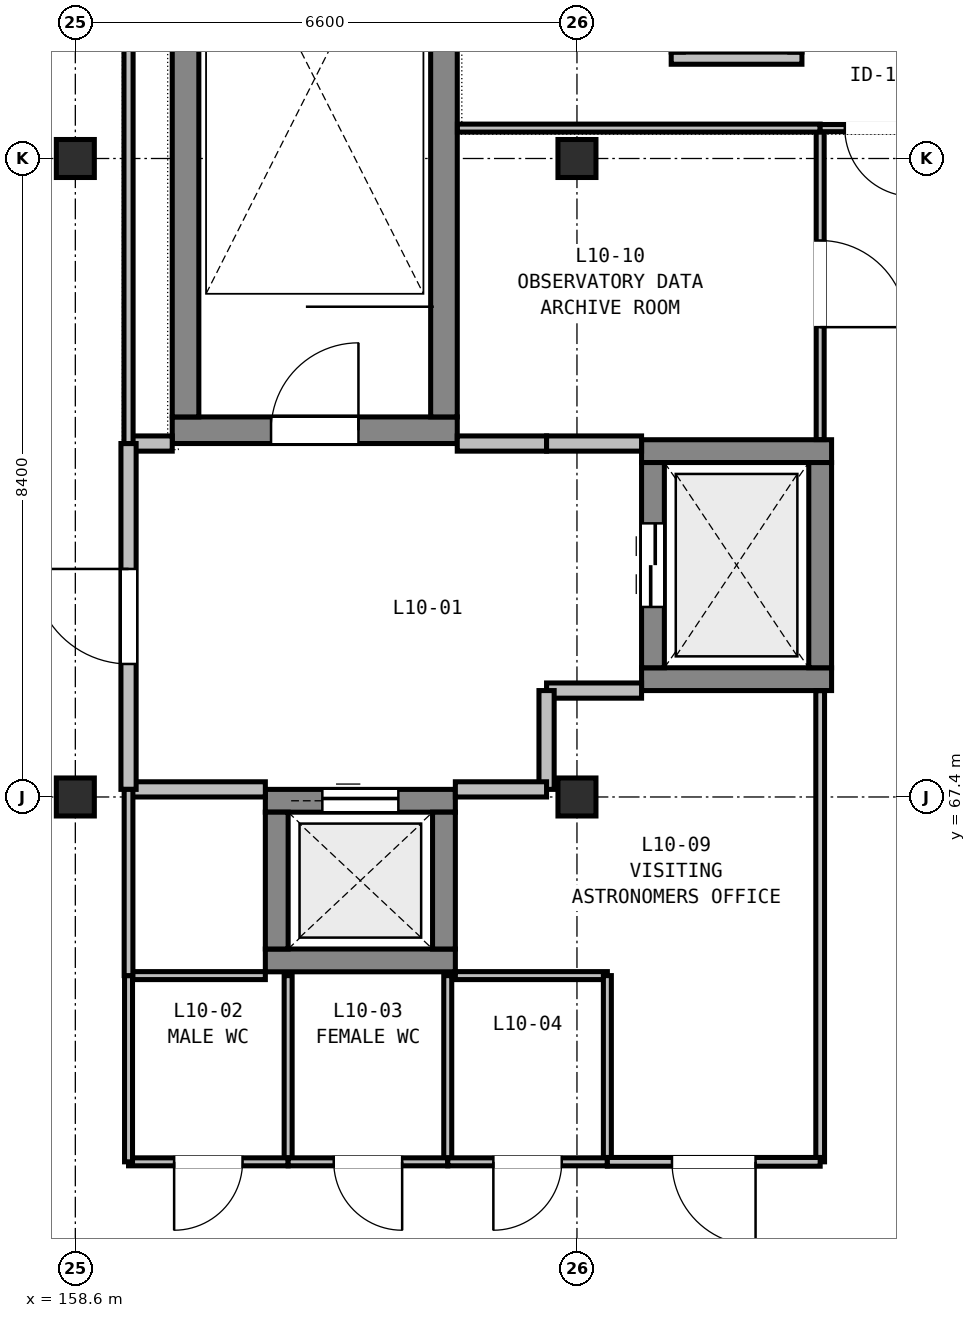
"""IFC4 building model, lengths in metres.
Left out: names, types, materials, properties, quantities, classifications, styles, units other than length and angle.
Written with IfcOpenShell. Run it as: python <this file> out.ifc"""

import sys

from ifc_helpers import new_model, si_unit, direction, frame, frame_2d, origin, origin_2d, place, context, subcontext, project, spatial, rectangle, extrude, element, fill, save


model = new_model("IFC4")
c1 = context("Model", 3, precision=1e-05, world=origin(), true_north=direction((0.0, 1.0)))
c2 = subcontext(c1, "Body", "Model", "MODEL_VIEW")
j1 = project(units=[si_unit("LENGTHUNIT", "METRE"), si_unit("PLANEANGLEUNIT", "RADIAN")], contexts=[c1])
p1 = place(None, origin())
s1 = spatial("IfcSite", under=j1, at=p1, CompositionType="ELEMENT")
p2 = place(p1, origin())
s2 = spatial("IfcBuilding", under=s1, at=p2, CompositionType="ELEMENT")
p3 = place(p2, frame((0.0, 0.0, 44.4)))
s3 = spatial("IfcBuildingStorey", under=s2, at=p3, CompositionType="ELEMENT", Elevation=44.4)
for number, where, z_axis, x_axis in (
    (1, (158.6, 67.4, 0.0), (0.0, 0.0, 1.0), (1.0, 0.0, 0.0)),
    (2, (158.6, 75.8, 0.0), (0.0, 0.0, 1.0), (1.0, 0.0, 0.0)),
    (3, (165.2, 67.4, 0.0), (0.0, 0.0, 1.0), (1.0, 0.0, 0.0)),
    (4, (165.2, 75.8, 0.0), (0.0, 0.0, 1.0), (1.0, 0.0, 0.0)),
):
    element("IfcColumn", number, at=place(p3, frame(where, z_axis=z_axis, x_axis=x_axis)), inside=s3, PredefinedType="COLUMN", context=c2, shape_type="SweptSolid", body=[
        extrude(rectangle(XDim=0.5, YDim=0.5, at=origin_2d()), origin(), (0.0, 0.0, 1.0), 3.72),
    ])
p4 = place(p3, frame((159.875, 72.225, 0.0), z_axis=(0.0, 0.0, 1.0), x_axis=(1.0, 0.0, 0.0)))
e5 = element("IfcWall", 5, at=p4, inside=s3, PredefinedType="SHEAR", context=c2, shape_type="SweptSolid", body=[
    extrude(rectangle(XDim=3.75, YDim=0.35, at=frame_2d((1.875, 0.0))), origin(), (0.0, 0.0, 1.0), 3.55),
])
p5 = place(p4, frame((1.3, 0.0, 0.0)))
e6 = element("IfcOpeningElement", 6, at=p5, cuts=e5, PredefinedType="OPENING", context=c2, shape_type="SweptSolid", body=[
    extrude(rectangle(XDim=1.15, YDim=2.15, at=frame_2d((0.575, 1.075))), frame((0.0, 0.185, 0.0), z_axis=(0.0, -1.0, 0.0), x_axis=(1.0, 0.0, 0.0)), (0.0, 0.0, 1.0), 0.37),
])
for number, where, z_axis, x_axis in (
    (7, (160.05, 72.4, 0.0), (0.0, 0.0, 1.0), (0.0, 1.0, 0.0)),
    (8, (163.45, 72.4, 0.0), (0.0, 0.0, 1.0), (0.0, 1.0, 0.0)),
):
    element("IfcWall", number, at=place(p3, frame(where, z_axis=z_axis, x_axis=x_axis)), inside=s3, PredefinedType="SHEAR", context=c2, shape_type="SweptSolid", body=[
        extrude(rectangle(XDim=7.375, YDim=0.35, at=frame_2d((3.688, 0.0))), origin(), (0.0, 0.0, 1.0), 3.55),
    ])
for number, where, z_axis, x_axis in (
    (9, (166.05, 68.95, 0.0), (0.0, 0.0, 1.0), (1.0, 0.0, 0.0)),
    (10, (166.05, 71.95, 0.0), (0.0, 0.0, 1.0), (1.0, 0.0, 0.0)),
):
    element("IfcWall", number, at=place(p3, frame(where, z_axis=z_axis, x_axis=x_axis)), inside=s3, PredefinedType="SHEAR", context=c2, shape_type="SweptSolid", body=[
        extrude(rectangle(XDim=2.5, YDim=0.3, at=frame_2d((1.25, 0.0))), origin(), (0.0, 0.0, 1.0), 3.55),
    ])
p6 = place(p3, frame((166.2, 69.1, 0.0), z_axis=(0.0, 0.0, 1.0), x_axis=(0.0, 1.0, 0.0)))
e11 = element("IfcWall", 11, at=p6, inside=s3, PredefinedType="SHEAR", context=c2, shape_type="SweptSolid", body=[
    extrude(rectangle(XDim=2.7, YDim=0.3, at=frame_2d((1.35, 0.0))), origin(), (0.0, 0.0, 1.0), 3.55),
])
p7 = place(p6, frame((0.8, 0.0, 0.0)))
e12 = element("IfcOpeningElement", 12, at=p7, cuts=e11, PredefinedType="OPENING", context=c2, shape_type="SweptSolid", body=[
    extrude(rectangle(XDim=1.1, YDim=2.1, at=frame_2d((0.55, 1.05))), frame((0.0, 0.16, 0.0), z_axis=(0.0, -1.0, 0.0), x_axis=(1.0, 0.0, 0.0)), (0.0, 0.0, 1.0), 0.32),
])
p8 = place(p3, frame((168.4, 69.1, 0.0), z_axis=(0.0, 0.0, 1.0), x_axis=(0.0, 1.0, 0.0)))
e13 = element("IfcWall", 13, at=p8, inside=s3, PredefinedType="SHEAR", context=c2, shape_type="SweptSolid", body=[
    extrude(rectangle(XDim=2.7, YDim=0.3, at=frame_2d((1.35, 0.0))), origin(), (0.0, 0.0, 1.0), 3.55),
])
p9 = place(p3, frame((161.1, 65.25, 0.0), z_axis=(0.0, 0.0, 1.0), x_axis=(1.0, 0.0, 0.0)))
e14 = element("IfcWall", 14, at=p9, inside=s3, PredefinedType="SHEAR", context=c2, shape_type="SweptSolid", body=[
    extrude(rectangle(XDim=2.5, YDim=0.3, at=frame_2d((1.25, 0.0))), origin(), (0.0, 0.0, 1.0), 3.55),
])
p10 = place(p3, frame((161.1, 67.35, 0.0), z_axis=(0.0, 0.0, 1.0), x_axis=(1.0, 0.0, 0.0)))
e15 = element("IfcWall", 15, at=p10, inside=s3, PredefinedType="SHEAR", context=c2, shape_type="SweptSolid", body=[
    extrude(rectangle(XDim=2.5, YDim=0.3, at=frame_2d((1.25, 0.0))), origin(), (0.0, 0.0, 1.0), 3.55),
])
p11 = place(p10, frame((0.75, 0.0, 0.0)))
e16 = element("IfcOpeningElement", 16, at=p11, cuts=e15, PredefinedType="OPENING", context=c2, shape_type="SweptSolid", body=[
    extrude(rectangle(XDim=1.0, YDim=2.1, at=frame_2d((0.5, 1.05))), frame((0.0, 0.16, 0.0), z_axis=(0.0, -1.0, 0.0), x_axis=(1.0, 0.0, 0.0)), (0.0, 0.0, 1.0), 0.32),
])
for number, where, z_axis, x_axis in (
    (17, (161.25, 65.4, 0.0), (0.0, 0.0, 1.0), (0.0, 1.0, 0.0)),
    (18, (163.45, 65.4, 0.0), (0.0, 0.0, 1.0), (0.0, 1.0, 0.0)),
):
    element("IfcWall", number, at=place(p3, frame(where, z_axis=z_axis, x_axis=x_axis)), inside=s3, PredefinedType="SHEAR", context=c2, shape_type="SweptSolid", body=[
        extrude(rectangle(XDim=1.8, YDim=0.3, at=frame_2d((0.9, 0.0))), origin(), (0.0, 0.0, 1.0), 3.55),
    ])
p12 = place(p3, frame((166.44, 77.12, 0.0), z_axis=(0.0, 0.0, 1.0), x_axis=(1.0, 0.0, 0.0)))
e19 = element("IfcWall", 19, at=p12, inside=s3, PredefinedType="PARTITIONING", context=c2, shape_type="SweptSolid", body=[
    extrude(rectangle(XDim=1.72, YDim=0.16, at=frame_2d((0.86, 0.0))), origin(), (0.0, 0.0, 1.0), 3.36),
])
p13 = place(p3, frame((159.3, 72.05, 0.0), z_axis=(0.0, 0.0, 1.0), x_axis=(1.0, 0.0, 0.0)))
e20 = element("IfcWall", 20, at=p13, inside=s3, PredefinedType="PARTITIONING", context=c2, shape_type="SweptSolid", body=[
    extrude(rectangle(XDim=0.575, YDim=0.2, at=frame_2d((0.288, 0.0))), origin(), (0.0, 0.0, 1.0), 3.36),
])
p14 = place(p3, frame((163.625, 72.05, 0.0), z_axis=(0.0, 0.0, 1.0), x_axis=(1.0, 0.0, 0.0)))
e21 = element("IfcWall", 21, at=p14, inside=s3, PredefinedType="PARTITIONING", context=c2, shape_type="SweptSolid", body=[
    extrude(rectangle(XDim=1.175, YDim=0.2, at=frame_2d((0.587, 0.0))), origin(), (0.0, 0.0, 1.0), 2.635),
])
for number, where, z_axis, x_axis in (
    (22, (164.8, 72.05, 0.0), (0.0, 0.0, 1.0), (1.0, 0.0, 0.0)),
    (23, (166.05, 68.8, 0.0), (0.0, 0.0, 1.0), (-1.0, 0.0, 0.0)),
):
    element("IfcWall", number, at=place(p3, frame(where, z_axis=z_axis, x_axis=x_axis)), inside=s3, PredefinedType="PARTITIONING", context=c2, shape_type="SweptSolid", body=[
        extrude(rectangle(XDim=1.25, YDim=0.2, at=frame_2d((0.625, 0.0))), origin(), (0.0, 0.0, 1.0), 2.635),
    ])
p15 = place(p3, frame((164.8, 68.8, 0.0), z_axis=(0.0, 0.0, 1.0), x_axis=(0.0, -1.0, 0.0)))
e24 = element("IfcWall", 24, at=p15, inside=s3, PredefinedType="PARTITIONING", context=c2, shape_type="SweptSolid", body=[
    extrude(rectangle(XDim=1.3, YDim=0.2, at=frame_2d((0.65, 0.0))), origin(), (0.0, 0.0, 1.0), 2.635),
])
p16 = place(p3, frame((164.8, 67.5, 0.0), z_axis=(0.0, 0.0, 1.0), x_axis=(-1.0, 0.0, 0.0)))
e25 = element("IfcWall", 25, at=p16, inside=s3, PredefinedType="PARTITIONING", context=c2, shape_type="SweptSolid", body=[
    extrude(rectangle(XDim=1.2, YDim=0.2, at=frame_2d((0.6, 0.0))), origin(), (0.0, 0.0, 1.0), 2.885),
])
p17 = place(p3, frame((161.1, 67.5, 0.0), z_axis=(0.0, 0.0, 1.0), x_axis=(-1.0, 0.0, 0.0)))
e26 = element("IfcWall", 26, at=p17, inside=s3, PredefinedType="PARTITIONING", context=c2, shape_type="SweptSolid", body=[
    extrude(rectangle(XDim=1.8, YDim=0.2, at=frame_2d((0.9, 0.0))), origin(), (0.0, 0.0, 1.0), 2.885),
])
p18 = place(p3, frame((159.3, 67.5, 0.0), z_axis=(0.0, 0.0, 1.0), x_axis=(0.0, 1.0, 0.0)))
e27 = element("IfcWall", 27, at=p18, inside=s3, PredefinedType="PARTITIONING", context=c2, shape_type="SweptSolid", body=[
    extrude(rectangle(XDim=4.55, YDim=0.2, at=frame_2d((2.275, 0.0))), origin(), (0.0, 0.0, 1.0), 2.885),
])
p19 = place(p18, frame((1.65, 0.0, 0.0)))
e28 = element("IfcOpeningElement", 28, at=p19, cuts=e27, PredefinedType="OPENING", context=c2, shape_type="SweptSolid", body=[
    extrude(rectangle(XDim=1.25, YDim=2.15, at=frame_2d((0.625, 1.075))), frame((0.0, 0.11, 0.0), z_axis=(0.0, -1.0, 0.0), x_axis=(1.0, 0.0, 0.0)), (0.0, 0.0, 1.0), 0.22),
])
p20 = place(p3, frame((159.3, 65.05, 0.0), z_axis=(0.0, 0.0, 1.0), x_axis=(1.0, 0.0, 0.0)))
e29 = element("IfcWall", 29, at=p20, inside=s3, PredefinedType="PARTITIONING", context=c2, shape_type="SweptSolid", body=[
    extrude(rectangle(XDim=1.8, YDim=0.105, at=frame_2d((0.9, 0.0))), origin(), (0.0, 0.0, 1.0), 3.36),
])
p21 = place(p3, frame((161.4, 65.05, 0.0), z_axis=(0.0, 0.0, 1.0), x_axis=(0.0, -1.0, 0.0)))
e30 = element("IfcWall", 30, at=p21, inside=s3, PredefinedType="PARTITIONING", context=c2, shape_type="SweptSolid", body=[
    extrude(rectangle(XDim=2.45, YDim=0.105, at=frame_2d((1.225, 0.0))), origin(), (0.0, 0.0, 1.0), 3.36),
])
p22 = place(p3, frame((161.4, 62.6, 0.0), z_axis=(0.0, 0.0, 1.0), x_axis=(-1.0, 0.0, 0.0)))
e31 = element("IfcWall", 31, at=p22, inside=s3, PredefinedType="PARTITIONING", context=c2, shape_type="SweptSolid", body=[
    extrude(rectangle(XDim=2.1, YDim=0.105, at=frame_2d((1.05, 0.0))), origin(), (0.0, 0.0, 1.0), 3.36),
])
p23 = place(p22, frame((0.6, 0.0, 0.0)))
e32 = element("IfcOpeningElement", 32, at=p23, cuts=e31, PredefinedType="OPENING", context=c2, shape_type="SweptSolid", body=[
    extrude(rectangle(XDim=0.9, YDim=2.02, at=frame_2d((0.45, 1.01))), frame((0.0, 0.062, 0.0), z_axis=(0.0, -1.0, 0.0), x_axis=(1.0, 0.0, 0.0)), (0.0, 0.0, 1.0), 0.125),
])
for number, where, z_axis, x_axis in (
    (33, (159.3, 62.6, 0.0), (0.0, 0.0, 1.0), (0.0, 1.0, 0.0)),
    (34, (163.5, 65.05, 0.0), (0.0, 0.0, 1.0), (0.0, -1.0, 0.0)),
):
    element("IfcWall", number, at=place(p3, frame(where, z_axis=z_axis, x_axis=x_axis)), inside=s3, PredefinedType="PARTITIONING", context=c2, shape_type="SweptSolid", body=[
        extrude(rectangle(XDim=2.45, YDim=0.105, at=frame_2d((1.225, 0.0))), origin(), (0.0, 0.0, 1.0), 3.36),
    ])
p24 = place(p3, frame((163.5, 62.6, 0.0), z_axis=(0.0, 0.0, 1.0), x_axis=(-1.0, 0.0, 0.0)))
e35 = element("IfcWall", 35, at=p24, inside=s3, PredefinedType="PARTITIONING", context=c2, shape_type="SweptSolid", body=[
    extrude(rectangle(XDim=2.1, YDim=0.105, at=frame_2d((1.05, 0.0))), origin(), (0.0, 0.0, 1.0), 3.36),
])
p25 = place(p24, frame((0.6, 0.0, 0.0)))
e36 = element("IfcOpeningElement", 36, at=p25, cuts=e35, PredefinedType="OPENING", context=c2, shape_type="SweptSolid", body=[
    extrude(rectangle(XDim=0.9, YDim=2.02, at=frame_2d((0.45, 1.01))), frame((0.0, 0.062, 0.0), z_axis=(0.0, -1.0, 0.0), x_axis=(1.0, 0.0, 0.0)), (0.0, 0.0, 1.0), 0.125),
])
p26 = place(p3, frame((163.6, 65.05, 0.0), z_axis=(0.0, 0.0, 1.0), x_axis=(1.0, 0.0, 0.0)))
e37 = element("IfcWall", 37, at=p26, inside=s3, PredefinedType="PARTITIONING", context=c2, shape_type="SweptSolid", body=[
    extrude(rectangle(XDim=2.0, YDim=0.105, at=frame_2d((1.0, 0.0))), origin(), (0.0, 0.0, 1.0), 3.36),
])
p27 = place(p3, frame((165.6, 65.05, 0.0), z_axis=(0.0, 0.0, 1.0), x_axis=(0.0, -1.0, 0.0)))
e38 = element("IfcWall", 38, at=p27, inside=s3, PredefinedType="PARTITIONING", context=c2, shape_type="SweptSolid", body=[
    extrude(rectangle(XDim=2.45, YDim=0.105, at=frame_2d((1.225, 0.0))), origin(), (0.0, 0.0, 1.0), 3.36),
])
p28 = place(p3, frame((165.6, 62.6, 0.0), z_axis=(0.0, 0.0, 1.0), x_axis=(-1.0, 0.0, 0.0)))
e39 = element("IfcWall", 39, at=p28, inside=s3, PredefinedType="PARTITIONING", context=c2, shape_type="SweptSolid", body=[
    extrude(rectangle(XDim=2.1, YDim=0.105, at=frame_2d((1.05, 0.0))), origin(), (0.0, 0.0, 1.0), 3.36),
])
p29 = place(p28, frame((0.6, 0.0, 0.0)))
e40 = element("IfcOpeningElement", 40, at=p29, cuts=e39, PredefinedType="OPENING", context=c2, shape_type="SweptSolid", body=[
    extrude(rectangle(XDim=0.9, YDim=2.02, at=frame_2d((0.45, 1.01))), frame((0.0, 0.062, 0.0), z_axis=(0.0, -1.0, 0.0), x_axis=(1.0, 0.0, 0.0)), (0.0, 0.0, 1.0), 0.125),
])
p30 = place(p3, frame((159.3, 72.05, 0.0), z_axis=(0.0, 0.0, 1.0), x_axis=(0.0, 1.0, 0.0)))
e41 = element("IfcWall", 41, at=p30, inside=s3, PredefinedType="PARTITIONING", context=c2, shape_type="SweptSolid", body=[
    extrude(rectangle(XDim=6.15, YDim=0.12, at=frame_2d((3.075, 0.0))), origin(), (0.0, 0.0, 1.0), 2.885),
])
p31 = place(p3, frame((168.4, 68.798, 0.0), z_axis=(0.0, 0.0, 1.0), x_axis=(0.0, -1.0, 0.0)))
e42 = element("IfcWall", 42, at=p31, inside=s3, PredefinedType="PARTITIONING", context=c2, shape_type="SweptSolid", body=[
    extrude(rectangle(XDim=6.198, YDim=0.115, at=frame_2d((3.099, 0.0))), origin(), (0.0, 0.0, 1.0), 3.36),
])
p32 = place(p3, frame((168.4, 62.6, 0.0), z_axis=(0.0, 0.0, 1.0), x_axis=(-1.0, 0.0, 0.0)))
e43 = element("IfcWall", 43, at=p32, inside=s3, PredefinedType="PARTITIONING", context=c2, shape_type="SweptSolid", body=[
    extrude(rectangle(XDim=2.8, YDim=0.115, at=frame_2d((1.4, 0.0))), origin(), (0.0, 0.0, 1.0), 3.36),
])
p33 = place(p32, frame((0.85, 0.0, 0.0)))
e44 = element("IfcOpeningElement", 44, at=p33, cuts=e43, PredefinedType="OPENING", context=c2, shape_type="SweptSolid", body=[
    extrude(rectangle(XDim=1.1, YDim=2.06, at=frame_2d((0.55, 1.03))), frame((0.0, 0.067, 0.0), z_axis=(0.0, -1.0, 0.0), x_axis=(1.0, 0.0, 0.0)), (0.0, 0.0, 1.0), 0.135),
])
p34 = place(p3, frame((159.3, 65.05, 0.0), z_axis=(0.0, 0.0, 1.0), x_axis=(0.0, 1.0, 0.0)))
e45 = element("IfcWall", 45, at=p34, inside=s3, PredefinedType="PARTITIONING", context=c2, shape_type="SweptSolid", body=[
    extrude(rectangle(XDim=2.45, YDim=0.115, at=frame_2d((1.225, 0.0))), origin(), (0.0, 0.0, 1.0), 2.885),
])
p35 = place(p3, frame((168.4, 76.2, 0.0), z_axis=(0.0, 0.0, 1.0), x_axis=(0.0, -1.0, 0.0)))
e46 = element("IfcWall", 46, at=p35, inside=s3, PredefinedType="PARTITIONING", context=c2, shape_type="SweptSolid", body=[
    extrude(rectangle(XDim=4.098, YDim=0.105, at=frame_2d((2.049, 0.0))), origin(), (0.0, 0.0, 1.0), 3.36),
])
p36 = place(p35, frame((1.479, 0.0, 0.0)))
e47 = element("IfcOpeningElement", 47, at=p36, cuts=e46, PredefinedType="OPENING", context=c2, shape_type="SweptSolid", body=[
    extrude(rectangle(XDim=1.14, YDim=2.06, at=frame_2d((0.57, 1.03))), frame((0.0, 0.062, 0.0), z_axis=(0.0, -1.0, 0.0), x_axis=(1.0, 0.0, 0.0)), (0.0, 0.0, 1.0), 0.125),
])
p37 = place(p3, frame((163.627, 76.2, 0.0), z_axis=(0.0, 0.0, 1.0), x_axis=(1.0, 0.0, 0.0)))
e48 = element("IfcWall", 48, at=p37, inside=s3, PredefinedType="PARTITIONING", context=c2, shape_type="SweptSolid", body=[
    extrude(rectangle(XDim=4.773, YDim=0.105, at=frame_2d((2.386, 0.0))), origin(), (0.0, 0.0, 1.0), 3.36),
])
p38 = place(p3, frame((169.948, 76.2, 0.0), z_axis=(0.0, 0.0, 1.0), x_axis=(-1.0, 0.0, 0.0)))
e49 = element("IfcWall", 49, at=p38, inside=s3, PredefinedType="PARTITIONING", context=c2, shape_type="SweptSolid", body=[
    extrude(rectangle(XDim=1.548, YDim=0.095, at=frame_2d((0.774, 0.0))), origin(), (0.0, 0.0, 1.0), 3.36),
])
p39 = place(p38, frame((0.324, 0.0, 0.0)))
e50 = element("IfcOpeningElement", 50, at=p39, cuts=e49, PredefinedType="OPENING", context=c2, shape_type="SweptSolid", body=[
    extrude(rectangle(XDim=0.9, YDim=2.1, at=frame_2d((0.45, 1.05))), frame((0.0, 0.057, 0.0), z_axis=(0.0, -1.0, 0.0), x_axis=(1.0, 0.0, 0.0)), (0.0, 0.0, 1.0), 0.115),
])
p40 = place(p5, origin())
e51 = element("IfcDoor", 51, at=p40, inside=s3, OperationType="SINGLE_SWING_RIGHT", PredefinedType="DOOR", context=c2, shape_type="SweptSolid", body=[
    extrude(rectangle(XDim=1.15, YDim=2.15, at=frame_2d((0.575, 1.075))), frame((0.0, 0.025, 0.0), z_axis=(0.0, -1.0, 0.0), x_axis=(1.0, 0.0, 0.0)), (0.0, 0.0, 1.0), 0.05),
])
fill(e6, e51)
p41 = place(p7, origin())
e52 = element("IfcDoor", 52, at=p41, inside=s3, OperationType="DOUBLE_DOOR_SLIDING", PredefinedType="DOOR", context=c2, shape_type="SweptSolid", body=[
    extrude(rectangle(XDim=1.1, YDim=2.1, at=frame_2d((0.55, 1.05))), frame((0.0, 0.025, 0.0), z_axis=(0.0, -1.0, 0.0), x_axis=(1.0, 0.0, 0.0)), (0.0, 0.0, 1.0), 0.05),
])
fill(e12, e52)
p42 = place(p11, origin())
e53 = element("IfcDoor", 53, at=p42, inside=s3, OperationType="SLIDING_TO_LEFT", PredefinedType="DOOR", context=c2, shape_type="SweptSolid", body=[
    extrude(rectangle(XDim=1.0, YDim=2.1, at=frame_2d((0.5, 1.05))), frame((0.0, 0.025, 0.0), z_axis=(0.0, -1.0, 0.0), x_axis=(1.0, 0.0, 0.0)), (0.0, 0.0, 1.0), 0.05),
])
fill(e16, e53)
p43 = place(p19, origin())
e54 = element("IfcDoor", 54, at=p43, inside=s3, OperationType="SINGLE_SWING_RIGHT", PredefinedType="DOOR", context=c2, shape_type="SweptSolid", body=[
    extrude(rectangle(XDim=1.25, YDim=2.15, at=frame_2d((0.625, 1.075))), frame((0.0, 0.025, 0.0), z_axis=(0.0, -1.0, 0.0), x_axis=(1.0, 0.0, 0.0)), (0.0, 0.0, 1.0), 0.05),
])
fill(e28, e54)
p44 = place(p23, origin())
e55 = element("IfcDoor", 55, at=p44, inside=s3, OperationType="SINGLE_SWING_RIGHT", PredefinedType="DOOR", context=c2, shape_type="SweptSolid", body=[
    extrude(rectangle(XDim=0.9, YDim=2.02, at=frame_2d((0.45, 1.01))), frame((0.0, 0.025, 0.0), z_axis=(0.0, -1.0, 0.0), x_axis=(1.0, 0.0, 0.0)), (0.0, 0.0, 1.0), 0.05),
])
fill(e32, e55)
p45 = place(p25, origin())
e56 = element("IfcDoor", 56, at=p45, inside=s3, OperationType="SINGLE_SWING_LEFT", PredefinedType="DOOR", context=c2, shape_type="SweptSolid", body=[
    extrude(rectangle(XDim=0.9, YDim=2.02, at=frame_2d((0.45, 1.01))), frame((0.0, 0.025, 0.0), z_axis=(0.0, -1.0, 0.0), x_axis=(1.0, 0.0, 0.0)), (0.0, 0.0, 1.0), 0.05),
])
fill(e36, e56)
p46 = place(p29, origin())
e57 = element("IfcDoor", 57, at=p46, inside=s3, OperationType="SINGLE_SWING_RIGHT", PredefinedType="DOOR", context=c2, shape_type="SweptSolid", body=[
    extrude(rectangle(XDim=0.9, YDim=2.02, at=frame_2d((0.45, 1.01))), frame((0.0, 0.025, 0.0), z_axis=(0.0, -1.0, 0.0), x_axis=(1.0, 0.0, 0.0)), (0.0, 0.0, 1.0), 0.05),
])
fill(e40, e57)
p47 = place(p33, origin())
e58 = element("IfcDoor", 58, at=p47, inside=s3, OperationType="SINGLE_SWING_LEFT", PredefinedType="DOOR", context=c2, shape_type="SweptSolid", body=[
    extrude(rectangle(XDim=1.1, YDim=2.06, at=frame_2d((0.55, 1.03))), frame((0.0, 0.025, 0.0), z_axis=(0.0, -1.0, 0.0), x_axis=(1.0, 0.0, 0.0)), (0.0, 0.0, 1.0), 0.05),
])
fill(e44, e58)
p48 = place(p36, origin())
e59 = element("IfcDoor", 59, at=p48, inside=s3, OperationType="SINGLE_SWING_RIGHT", PredefinedType="DOOR", context=c2, shape_type="SweptSolid", body=[
    extrude(rectangle(XDim=1.14, YDim=2.06, at=frame_2d((0.57, 1.03))), frame((0.0, 0.025, 0.0), z_axis=(0.0, -1.0, 0.0), x_axis=(1.0, 0.0, 0.0)), (0.0, 0.0, 1.0), 0.05),
])
fill(e47, e59)
p49 = place(p39, origin())
e60 = element("IfcDoor", 60, at=p49, inside=s3, OperationType="SINGLE_SWING_LEFT", PredefinedType="DOOR", context=c2, shape_type="SweptSolid", body=[
    extrude(rectangle(XDim=0.9, YDim=2.1, at=frame_2d((0.45, 1.05))), frame((0.0, 0.025, 0.0), z_axis=(0.0, -1.0, 0.0), x_axis=(1.0, 0.0, 0.0)), (0.0, 0.0, 1.0), 0.05),
])
fill(e50, e60)
save(model, sys.argv[1])
